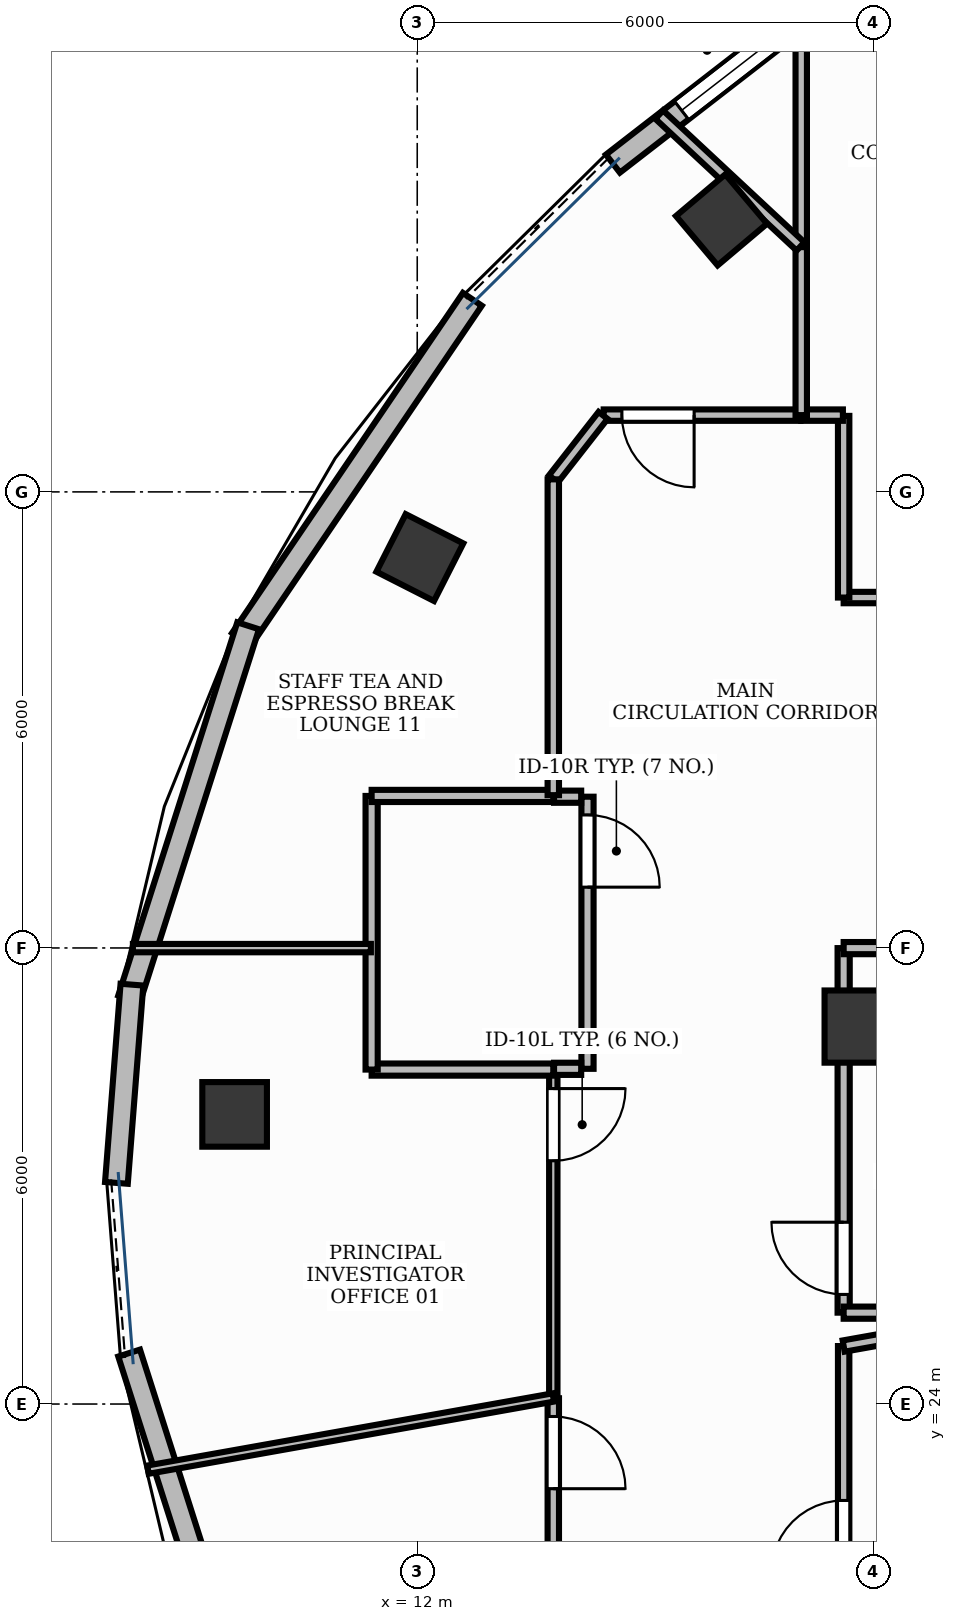
"""IFC4 building model, lengths in metres.
Left out: names, types, materials, properties, quantities, classifications, styles, units other than length and angle.
Written with IfcOpenShell. Run it as: python <this file> out.ifc"""

import sys

from ifc_helpers import new_model, si_unit, direction, frame, frame_2d, origin, origin_2d, place, context, subcontext, project, spatial, rectangle, extrude, element, fill, save


model = new_model("IFC4")
c1 = context("Model", 3, precision=1e-05, world=origin(), true_north=direction((0.0, 1.0)))
c2 = subcontext(c1, "Body", "Model", "MODEL_VIEW")
j1 = project(units=[si_unit("LENGTHUNIT", "METRE"), si_unit("PLANEANGLEUNIT", "RADIAN")], contexts=[c1])
p1 = place(None, origin())
s1 = spatial("IfcSite", under=j1, at=p1, CompositionType="ELEMENT")
p2 = place(p1, origin())
s2 = spatial("IfcBuilding", under=s1, at=p2, CompositionType="ELEMENT")
p3 = place(p2, frame((0.0, 0.0, 260.4)))
s3 = spatial("IfcBuildingStorey", under=s2, at=p3, CompositionType="ELEMENT", Elevation=260.4)
for number, where, z_axis, x_axis in (
    (1, (16.003, 39.579, -0.0), (0.0, 0.0, 1.0), (0.764, 0.645, 0.0)),
    (2, (12.034, 35.136, -0.0), (0.0, 0.0, 1.0), (0.453, 0.891, 0.0)),
    (3, (9.597, 27.81, -0.0), (0.0, 0.0, 1.0), (0.0, 1.0, 0.0)),
):
    element("IfcColumn", number, at=place(p3, frame(where, z_axis=z_axis, x_axis=x_axis)), inside=s3, PredefinedType="COLUMN", context=c2, shape_type="SweptSolid", body=[
        extrude(rectangle(XDim=0.85, YDim=0.85, at=origin_2d()), origin(), (0.0, 0.0, 1.0), 3.901),
    ])
p4 = place(p3, frame((17.834, 28.966, -0.0), z_axis=(0.0, 0.0, 1.0), x_axis=(1.0, 0.0, 0.0)))
e4 = element("IfcColumn", 4, at=p4, inside=s3, PredefinedType="COLUMN", context=c2, shape_type="SweptSolid", body=[
    extrude(rectangle(XDim=0.95, YDim=0.95, at=origin_2d()), origin(), (0.0, 0.0, 1.0), 3.901),
])
p5 = place(p3, frame((16.917, 42.134, 0.0), z_axis=(0.0, 0.0, 1.0), x_axis=(-0.790517782709, -0.612439086948, 0.0)))
e5 = element("IfcWall", 5, at=p5, inside=s3, PredefinedType="STANDARD", context=c2, shape_type="SweptSolid", body=[
    extrude(rectangle(XDim=2.963, YDim=0.3, at=frame_2d((1.481, 0.0))), origin(), (0.0, 0.0, 1.0), 3.9),
])
p6 = place(p5, frame((0.32, 0.0, 0.95)))
e6 = element("IfcOpeningElement", 6, at=p6, cuts=e5, PredefinedType="OPENING", context=c2, shape_type="SweptSolid", body=[
    extrude(rectangle(XDim=1.5, YDim=1.8, at=frame_2d((0.75, 0.9))), frame((0.0, 0.165, 0.0), z_axis=(0.0, -1.0, 0.0), x_axis=(1.0, 0.0, 0.0)), (0.0, 0.0, 1.0), 0.33),
])
p7 = place(p3, frame((12.725, 38.534, 0.0), z_axis=(0.0, 0.0, 1.0), x_axis=(-0.561547791281, -0.827444305139, 0.0)))
e7 = element("IfcWall", 7, at=p7, inside=s3, PredefinedType="STANDARD", context=c2, shape_type="SweptSolid", body=[
    extrude(rectangle(XDim=5.407, YDim=0.3, at=frame_2d((2.704, 0.0))), origin(), (0.0, 0.0, 1.0), 3.47),
])
p8 = place(p3, frame((9.775, 34.238, 0.0), z_axis=(0.0, 0.0, 1.0), x_axis=(-0.303876387353, -0.952711467974, 0.0)))
e8 = element("IfcWall", 8, at=p8, inside=s3, PredefinedType="STANDARD", context=c2, shape_type="SweptSolid", body=[
    extrude(rectangle(XDim=5.152, YDim=0.3, at=frame_2d((2.576, 0.0))), origin(), (0.0, 0.0, 1.0), 3.47),
])
p9 = place(p3, frame((8.247, 29.517, 0.0), z_axis=(0.0, 0.0, 1.0), x_axis=(-0.078109406708, -0.996944793147, 0.0)))
e9 = element("IfcWall", 9, at=p9, inside=s3, PredefinedType="STANDARD", context=c2, shape_type="SweptSolid", body=[
    extrude(rectangle(XDim=2.616, YDim=0.3, at=frame_2d((1.308, 0.0))), origin(), (0.0, 0.0, 1.0), 3.47),
])
p10 = place(p3, frame((8.21, 24.67, 0.0), z_axis=(0.0, 0.0, 1.0), x_axis=(0.303876387353, -0.952711467974, 0.0)))
e10 = element("IfcWall", 10, at=p10, inside=s3, PredefinedType="STANDARD", context=c2, shape_type="SweptSolid", body=[
    extrude(rectangle(XDim=5.152, YDim=0.3, at=frame_2d((2.576, 0.0))), origin(), (0.0, 0.0, 1.0), 3.9),
])
p11 = place(p3, frame((14.24, 31.99, 0.0), z_axis=(0.0, 0.0, 1.0), x_axis=(0.0, -1.0, 0.0)))
e11 = element("IfcWall", 11, at=p11, inside=s3, PredefinedType="PARTITIONING", context=c2, shape_type="SweptSolid", body=[
    extrude(rectangle(XDim=3.58, YDim=0.16, at=frame_2d((1.79, 0.0))), origin(), (0.0, 0.0, 1.0), 2.91),
])
p12 = place(p11, frame((0.24, 0.0, 0.0)))
e12 = element("IfcOpeningElement", 12, at=p12, cuts=e11, PredefinedType="OPENING", context=c2, shape_type="SweptSolid", body=[
    extrude(rectangle(XDim=0.95, YDim=2.15, at=frame_2d((0.475, 1.075))), frame((0.0, 0.095, 0.0), z_axis=(0.0, -1.0, 0.0), x_axis=(1.0, 0.0, 0.0)), (0.0, 0.0, 1.0), 0.19),
])
p13 = place(p3, frame((13.79, 28.39, 0.0), z_axis=(0.0, 0.0, 1.0), x_axis=(0.0, -1.0, 0.0)))
e13 = element("IfcWall", 13, at=p13, inside=s3, PredefinedType="MOVABLE", context=c2, shape_type="SweptSolid", body=[
    extrude(rectangle(XDim=4.304, YDim=0.11, at=frame_2d((2.152, 0.0))), origin(), (0.0, 0.0, 1.0), 2.91),
])
p14 = place(p13, frame((0.24, 0.0, 0.0)))
e14 = element("IfcOpeningElement", 14, at=p14, cuts=e13, PredefinedType="OPENING", context=c2, shape_type="SweptSolid", body=[
    extrude(rectangle(XDim=0.95, YDim=2.15, at=frame_2d((0.475, 1.075))), frame((0.0, 0.07, 0.0), z_axis=(0.0, -1.0, 0.0), x_axis=(1.0, 0.0, 0.0)), (0.0, 0.0, 1.0), 0.14),
])
p15 = place(p3, frame((13.79, 24.076, 0.0), z_axis=(0.0, 0.0, 1.0), x_axis=(0.0, -1.0, 0.0)))
e15 = element("IfcWall", 15, at=p15, inside=s3, PredefinedType="PARTITIONING", context=c2, shape_type="SweptSolid", body=[
    extrude(rectangle(XDim=6.241, YDim=0.15, at=frame_2d((3.12, 0.0))), origin(), (0.0, 0.0, 1.0), 2.91),
])
p16 = place(p15, frame((0.24, 0.0, 0.0)))
e16 = element("IfcOpeningElement", 16, at=p16, cuts=e15, PredefinedType="OPENING", context=c2, shape_type="SweptSolid", body=[
    extrude(rectangle(XDim=0.95, YDim=2.15, at=frame_2d((0.475, 1.075))), frame((0.0, 0.09, 0.0), z_axis=(0.0, -1.0, 0.0), x_axis=(1.0, 0.0, 0.0)), (0.0, 0.0, 1.0), 0.18),
])
p17 = place(p3, frame((17.61, 16.41, 0.0), z_axis=(0.0, 0.0, 1.0), x_axis=(0.0, 1.0, 0.0)))
e17 = element("IfcWall", 17, at=p17, inside=s3, PredefinedType="PARTITIONING", context=c2, shape_type="SweptSolid", body=[
    extrude(rectangle(XDim=8.353, YDim=0.15, at=frame_2d((4.176, 0.0))), origin(), (0.0, 0.0, 1.0), 2.91),
])
p18 = place(p17, frame((5.371, 0.0, 0.0)))
e18 = element("IfcOpeningElement", 18, at=p18, cuts=e17, PredefinedType="OPENING", context=c2, shape_type="SweptSolid", body=[
    extrude(rectangle(XDim=0.95, YDim=2.15, at=frame_2d((0.475, 1.075))), frame((0.0, 0.09, 0.0), z_axis=(0.0, -1.0, 0.0), x_axis=(1.0, 0.0, 0.0)), (0.0, 0.0, 1.0), 0.18),
])
p19 = place(p3, frame((17.042, 37.01, 0.0), z_axis=(0.0, 0.0, 1.0), x_axis=(-1.0, 0.0, 0.0)))
e19 = element("IfcWall", 19, at=p19, inside=s3, PredefinedType="PARTITIONING", context=c2, shape_type="SweptSolid", body=[
    extrude(rectangle(XDim=2.589, YDim=0.15, at=frame_2d((1.295, 0.0))), origin(), (0.0, 0.0, 1.0), 2.91),
])
p20 = place(p19, frame((1.399, 0.0, 0.0)))
e20 = element("IfcOpeningElement", 20, at=p20, cuts=e19, PredefinedType="OPENING", context=c2, shape_type="SweptSolid", body=[
    extrude(rectangle(XDim=0.95, YDim=2.15, at=frame_2d((0.475, 1.075))), frame((0.0, 0.09, 0.0), z_axis=(0.0, -1.0, 0.0), x_axis=(1.0, 0.0, 0.0)), (0.0, 0.0, 1.0), 0.18),
])
p21 = place(p3, frame((17.61, 25.202, 0.0), z_axis=(0.0, 0.0, 1.0), x_axis=(0.0, 1.0, 0.0)))
e21 = element("IfcWall", 21, at=p21, inside=s3, PredefinedType="PARTITIONING", context=c2, shape_type="SweptSolid", body=[
    extrude(rectangle(XDim=4.796, YDim=0.16, at=frame_2d((2.398, 0.0))), origin(), (0.0, 0.0, 1.0), 2.91),
])
p22 = place(p21, frame((0.24, 0.0, 0.0)))
e22 = element("IfcOpeningElement", 22, at=p22, cuts=e21, PredefinedType="OPENING", context=c2, shape_type="SweptSolid", body=[
    extrude(rectangle(XDim=0.95, YDim=2.15, at=frame_2d((0.475, 1.075))), frame((0.0, 0.095, 0.0), z_axis=(0.0, -1.0, 0.0), x_axis=(1.0, 0.0, 0.0)), (0.0, 0.0, 1.0), 0.19),
])
for number, where, z_axis, x_axis in (
    (23, (13.8, 31.99, 0.0), (0.0, 0.0, 1.0), (1.0, 0.0, 0.0)),
    (24, (14.157, 28.41, 0.0), (0.0, 0.0, 1.0), (-1.0, 0.0, 0.0)),
):
    element("IfcWall", number, at=place(p3, frame(where, z_axis=z_axis, x_axis=x_axis)), inside=s3, PredefinedType="PARTITIONING", context=c2, shape_type="SweptSolid", body=[
        extrude(rectangle(XDim=0.357, YDim=0.16, at=frame_2d((0.178, 0.0))), origin(), (0.0, 0.0, 1.0), 2.91),
    ])
p23 = place(p3, frame((13.79, 28.4, 0.0), z_axis=(0.0, 0.0, 1.0), x_axis=(-1.0, 0.0, 0.0)))
e25 = element("IfcWall", 25, at=p23, inside=s3, PredefinedType="PARTITIONING", context=c2, shape_type="SweptSolid", body=[
    extrude(rectangle(XDim=2.39, YDim=0.16, at=frame_2d((1.195, 0.0))), origin(), (0.0, 0.0, 1.0), 2.91),
])
p24 = place(p3, frame((11.4, 28.4, 0.0), z_axis=(0.0, 0.0, 1.0), x_axis=(0.0, 1.0, 0.0)))
e26 = element("IfcWall", 26, at=p24, inside=s3, PredefinedType="PARTITIONING", context=c2, shape_type="SweptSolid", body=[
    extrude(rectangle(XDim=3.6, YDim=0.16, at=frame_2d((1.8, 0.0))), origin(), (0.0, 0.0, 1.0), 2.91),
])
p25 = place(p3, frame((11.4, 32.0, 0.0), z_axis=(0.0, 0.0, 1.0), x_axis=(1.0, 0.0, 0.0)))
e27 = element("IfcWall", 27, at=p25, inside=s3, PredefinedType="PARTITIONING", context=c2, shape_type="SweptSolid", body=[
    extrude(rectangle(XDim=2.39, YDim=0.16, at=frame_2d((1.195, 0.0))), origin(), (0.0, 0.0, 1.0), 2.91),
])
p26 = place(p3, frame((8.259, 29.998, 0.0), z_axis=(0.0, 0.0, 1.0), x_axis=(1.0, 0.0, 0.0)))
e28 = element("IfcWall", 28, at=p26, inside=s3, PredefinedType="MOVABLE", context=c2, shape_type="SweptSolid", body=[
    extrude(rectangle(XDim=3.131, YDim=0.11, at=frame_2d((1.565, 0.0))), origin(), (0.0, 0.0, 1.0), 2.91),
])
p27 = place(p3, frame((13.79, 24.086, 0.0), z_axis=(0.0, 0.0, 1.0), x_axis=(-0.984501864113, -0.175374113137, 0.0)))
e29 = element("IfcWall", 29, at=p27, inside=s3, PredefinedType="MOVABLE", context=c2, shape_type="SweptSolid", body=[
    extrude(rectangle(XDim=5.417, YDim=0.11, at=frame_2d((2.708, 0.0))), origin(), (0.0, 0.0, 1.0), 2.91),
])
p28 = place(p3, frame((17.61, 24.763, 0.0), z_axis=(0.0, 0.0, 1.0), x_axis=(0.984503916892, 0.175362589008, 0.0)))
e30 = element("IfcWall", 30, at=p28, inside=s3, PredefinedType="PARTITIONING", context=c2, shape_type="SweptSolid", body=[
    extrude(rectangle(XDim=1.757, YDim=0.15, at=frame_2d((0.878, 0.0))), origin(), (0.0, 0.0, 1.0), 2.91),
])
p29 = place(p3, frame((17.052, 39.226, 0.0), z_axis=(0.0, 0.0, 1.0), x_axis=(0.0, 1.0, 0.0)))
e31 = element("IfcWall", 31, at=p29, inside=s3, PredefinedType="PARTITIONING", context=c2, shape_type="SweptSolid", body=[
    extrude(rectangle(XDim=3.099, YDim=0.15, at=frame_2d((1.549, 0.0))), origin(), (0.0, 0.0, 1.0), 2.91),
])
p30 = place(p3, frame((21.79, 34.61, 0.0), z_axis=(0.0, 0.0, 1.0), x_axis=(-1.0, 0.0, 0.0)))
e32 = element("IfcWall", 32, at=p30, inside=s3, PredefinedType="PARTITIONING", context=c2, shape_type="SweptSolid", body=[
    extrude(rectangle(XDim=4.18, YDim=0.15, at=frame_2d((2.09, 0.0))), origin(), (0.0, 0.0, 1.0), 2.91),
])
p31 = place(p3, frame((17.61, 34.61, 0.0), z_axis=(0.0, 0.0, 1.0), x_axis=(0.0, 1.0, 0.0)))
e33 = element("IfcWall", 33, at=p31, inside=s3, PredefinedType="PARTITIONING", context=c2, shape_type="SweptSolid", body=[
    extrude(rectangle(XDim=2.39, YDim=0.15, at=frame_2d((1.195, 0.0))), origin(), (0.0, 0.0, 1.0), 2.91),
])
p32 = place(p3, frame((17.6, 37.01, 0.0), z_axis=(0.0, 0.0, 1.0), x_axis=(-1.0, 0.0, 0.0)))
e34 = element("IfcWall", 34, at=p32, inside=s3, PredefinedType="PARTITIONING", context=c2, shape_type="SweptSolid", body=[
    extrude(rectangle(XDim=0.548, YDim=0.15, at=frame_2d((0.274, 0.0))), origin(), (0.0, 0.0, 1.0), 2.91),
])
p33 = place(p3, frame((17.052, 37.01, 0.0), z_axis=(0.0, 0.0, 1.0), x_axis=(0.0, 1.0, 0.0)))
e35 = element("IfcWall", 35, at=p33, inside=s3, PredefinedType="PARTITIONING", context=c2, shape_type="SweptSolid", body=[
    extrude(rectangle(XDim=2.21, YDim=0.15, at=frame_2d((1.105, 0.0))), origin(), (0.0, 0.0, 1.0), 2.91),
])
p34 = place(p3, frame((15.183, 40.963, 0.0), z_axis=(0.0, 0.0, 1.0), x_axis=(0.731313930883, -0.682041006462, 0.0)))
e36 = element("IfcWall", 36, at=p34, inside=s3, PredefinedType="PARTITIONING", context=c2, shape_type="SweptSolid", body=[
    extrude(rectangle(XDim=2.542, YDim=0.15, at=frame_2d((1.271, 0.0))), origin(), (0.0, 0.0, 1.0), 2.91),
])
p35 = place(p3, frame((14.445, 37.006, 0.0), z_axis=(0.0, 0.0, 1.0), x_axis=(-0.615836200745, -0.787874211948, 0.0)))
e37 = element("IfcWall", 37, at=p35, inside=s3, PredefinedType="PARTITIONING", context=c2, shape_type="SweptSolid", body=[
    extrude(rectangle(XDim=1.06, YDim=0.15, at=frame_2d((0.53, 0.0))), origin(), (0.0, 0.0, 1.0), 2.91),
])
p36 = place(p3, frame((13.79, 36.165, 0.0), z_axis=(0.0, 0.0, 1.0), x_axis=(0.0, -1.0, 0.0)))
e38 = element("IfcWall", 38, at=p36, inside=s3, PredefinedType="PARTITIONING", context=c2, shape_type="SweptSolid", body=[
    extrude(rectangle(XDim=4.155, YDim=0.15, at=frame_2d((2.077, 0.0))), origin(), (0.0, 0.0, 1.0), 2.91),
])
p37 = place(p3, frame((18.708, 25.202, 0.0), z_axis=(0.0, 0.0, 1.0), x_axis=(-1.0, 0.0, 0.0)))
e39 = element("IfcWall", 39, at=p37, inside=s3, PredefinedType="PARTITIONING", context=c2, shape_type="SweptSolid", body=[
    extrude(rectangle(XDim=1.098, YDim=0.16, at=frame_2d((0.549, 0.0))), origin(), (0.0, 0.0, 1.0), 2.91),
])
p38 = place(p3, frame((17.61, 29.998, 0.0), z_axis=(0.0, 0.0, 1.0), x_axis=(1.0, 0.0, 0.0)))
e40 = element("IfcWall", 40, at=p38, inside=s3, PredefinedType="PARTITIONING", context=c2, shape_type="SweptSolid", body=[
    extrude(rectangle(XDim=1.73, YDim=0.16, at=frame_2d((0.865, 0.0))), origin(), (0.0, 0.0, 1.0), 2.91),
])
p39 = place(p6, origin())
e41 = element("IfcWindow", 41, at=p39, inside=s3, PartitioningType="DOUBLE_PANEL_VERTICAL", PredefinedType="WINDOW", context=c2, shape_type="SweptSolid", body=[
    extrude(rectangle(XDim=1.5, YDim=1.8, at=frame_2d((0.75, 0.9))), frame((0.0, 0.03, 0.0), z_axis=(0.0, -1.0, 0.0), x_axis=(1.0, 0.0, 0.0)), (0.0, 0.0, 1.0), 0.06),
])
fill(e6, e41)
p40 = place(p12, origin())
e42 = element("IfcDoor", 42, at=p40, inside=s3, OperationType="SINGLE_SWING_RIGHT", PredefinedType="DOOR", context=c2, shape_type="SweptSolid", body=[
    extrude(rectangle(XDim=0.95, YDim=2.15, at=frame_2d((0.475, 1.075))), frame((0.0, 0.025, 0.0), z_axis=(0.0, -1.0, 0.0), x_axis=(1.0, 0.0, 0.0)), (0.0, 0.0, 1.0), 0.05),
])
fill(e12, e42)
p41 = place(p14, origin())
e43 = element("IfcDoor", 43, at=p41, inside=s3, OperationType="SINGLE_SWING_LEFT", PredefinedType="DOOR", context=c2, shape_type="SweptSolid", body=[
    extrude(rectangle(XDim=0.95, YDim=2.15, at=frame_2d((0.475, 1.075))), frame((0.0, 0.025, 0.0), z_axis=(0.0, -1.0, 0.0), x_axis=(1.0, 0.0, 0.0)), (0.0, 0.0, 1.0), 0.05),
])
fill(e14, e43)
p42 = place(p16, origin())
e44 = element("IfcDoor", 44, at=p42, inside=s3, OperationType="SINGLE_SWING_RIGHT", PredefinedType="DOOR", context=c2, shape_type="SweptSolid", body=[
    extrude(rectangle(XDim=0.95, YDim=2.15, at=frame_2d((0.475, 1.075))), frame((0.0, 0.025, 0.0), z_axis=(0.0, -1.0, 0.0), x_axis=(1.0, 0.0, 0.0)), (0.0, 0.0, 1.0), 0.05),
])
fill(e16, e44)
p43 = place(p18, origin())
e45 = element("IfcDoor", 45, at=p43, inside=s3, OperationType="SINGLE_SWING_LEFT", PredefinedType="DOOR", context=c2, shape_type="SweptSolid", body=[
    extrude(rectangle(XDim=0.95, YDim=2.15, at=frame_2d((0.475, 1.075))), frame((0.0, 0.025, 0.0), z_axis=(0.0, -1.0, 0.0), x_axis=(1.0, 0.0, 0.0)), (0.0, 0.0, 1.0), 0.05),
])
fill(e18, e45)
p44 = place(p20, origin())
e46 = element("IfcDoor", 46, at=p44, inside=s3, OperationType="SINGLE_SWING_LEFT", PredefinedType="DOOR", context=c2, shape_type="SweptSolid", body=[
    extrude(rectangle(XDim=0.95, YDim=2.15, at=frame_2d((0.475, 1.075))), frame((0.0, 0.025, 0.0), z_axis=(0.0, -1.0, 0.0), x_axis=(1.0, 0.0, 0.0)), (0.0, 0.0, 1.0), 0.05),
])
fill(e20, e46)
p45 = place(p22, origin())
e47 = element("IfcDoor", 47, at=p45, inside=s3, OperationType="SINGLE_SWING_RIGHT", PredefinedType="DOOR", context=c2, shape_type="SweptSolid", body=[
    extrude(rectangle(XDim=0.95, YDim=2.15, at=frame_2d((0.475, 1.075))), frame((0.0, 0.025, 0.0), z_axis=(0.0, -1.0, 0.0), x_axis=(1.0, 0.0, 0.0)), (0.0, 0.0, 1.0), 0.05),
])
fill(e22, e47)
save(model, sys.argv[1])
